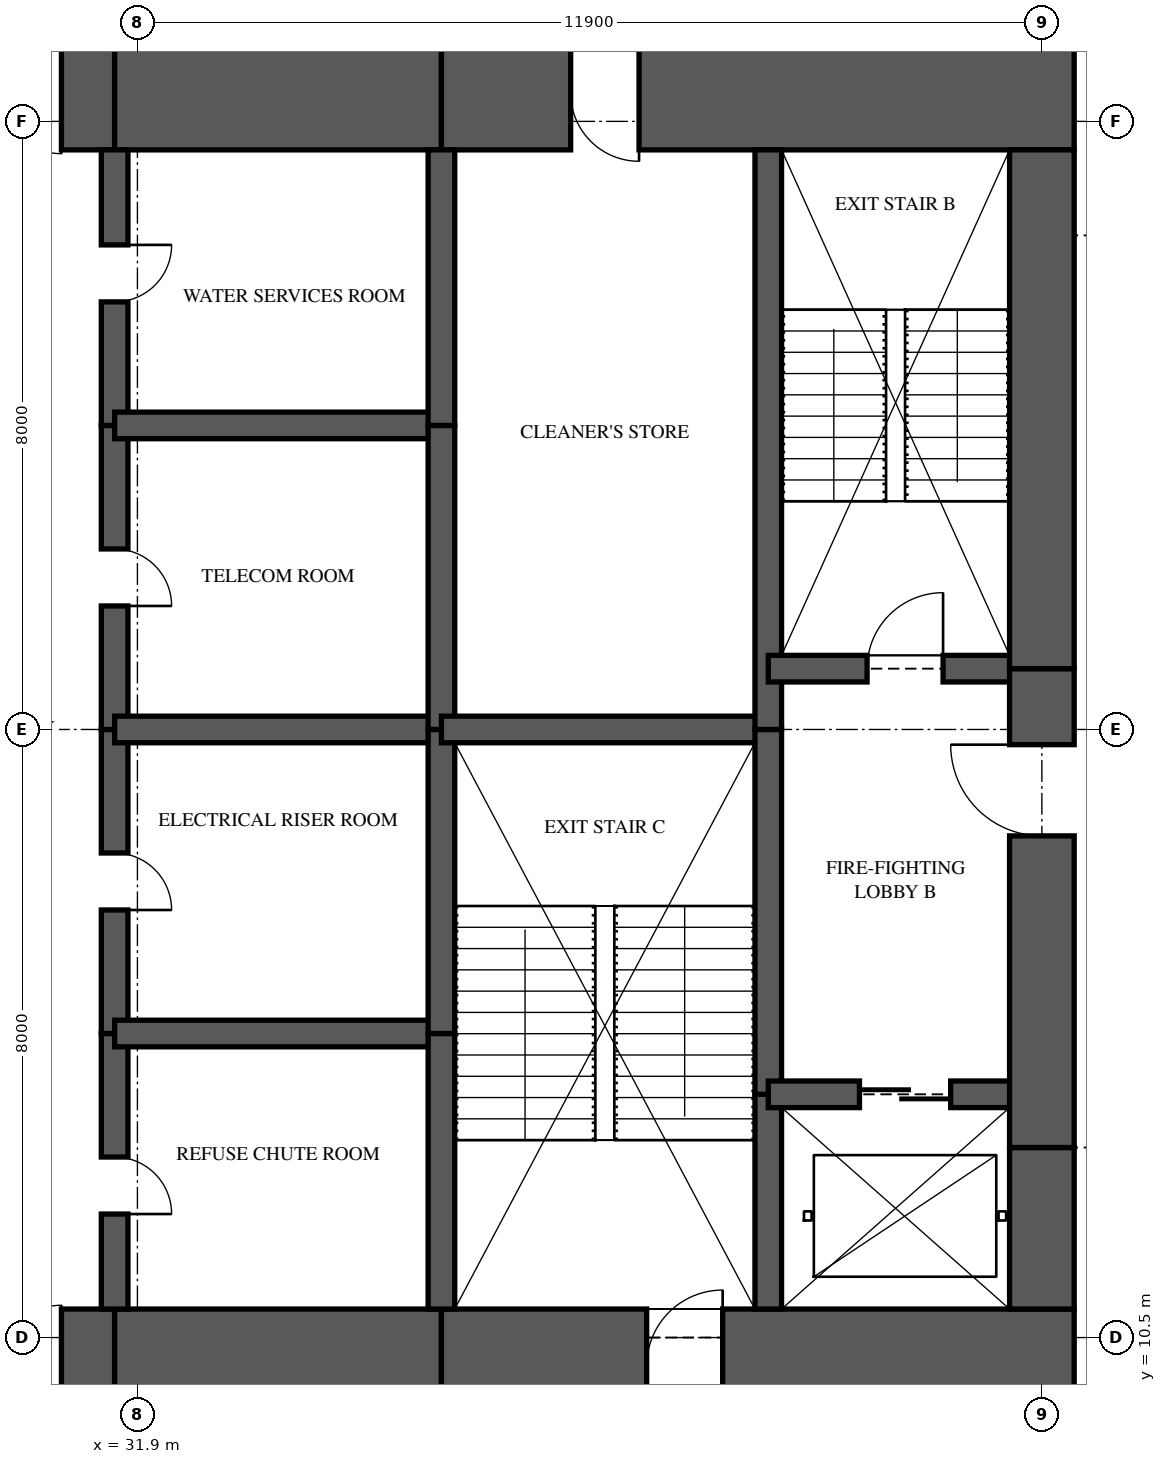
"""IFC4 building model, lengths in metres.
Left out: names, types, materials, properties, quantities, classifications, styles, units other than length and angle.
Written with IfcOpenShell. Run it as: python <this file> out.ifc"""

import sys

from ifc_helpers import new_model, si_unit, direction, frame, frame_2d, origin, place, context, subcontext, project, spatial, rectangle, extrude, element, fill, save


model = new_model("IFC4")
c1 = context("Model", 3, precision=1e-05, world=origin(), true_north=direction((0.0, 1.0)))
c2 = subcontext(c1, "Body", "Model", "MODEL_VIEW")
j1 = project(units=[si_unit("LENGTHUNIT", "METRE"), si_unit("PLANEANGLEUNIT", "RADIAN")], contexts=[c1])
p1 = place(None, origin())
s1 = spatial("IfcSite", under=j1, at=p1, CompositionType="ELEMENT")
p2 = place(p1, origin())
s2 = spatial("IfcBuilding", under=s1, at=p2, CompositionType="ELEMENT")
p3 = place(p2, frame((0.0, 0.0, 124.95)))
s3 = spatial("IfcBuildingStorey", under=s2, at=p3, CompositionType="ELEMENT", Elevation=124.95)
p4 = place(p3, frame((26.0, 10.125, 0.0), z_axis=(0.0, 0.0, 1.0), x_axis=(1.0, 0.0, 0.0)))
e1 = element("IfcWall", 1, at=p4, inside=s3, PredefinedType="SHEAR", context=c2, shape_type="SweptSolid", body=[
    extrude(rectangle(XDim=5.6, YDim=1.5, at=frame_2d((2.8, 0.0))), origin(), (0.0, 0.0, 1.0), 3.35),
])
p5 = place(p4, frame((3.3, 0.0, 0.0)))
e2 = element("IfcOpeningElement", 2, at=p5, cuts=e1, PredefinedType="OPENING", context=c2, shape_type="SweptSolid", body=[
    extrude(rectangle(XDim=1.6, YDim=2.1, at=frame_2d((0.8, 1.05))), frame((0.0, 0.76, 0.0), z_axis=(0.0, -1.0, 0.0), x_axis=(1.0, 0.0, 0.0)), (0.0, 0.0, 1.0), 1.52),
])
p6 = place(p3, frame((31.6, 10.125, 0.0), z_axis=(0.0, 0.0, 1.0), x_axis=(1.0, 0.0, 0.0)))
e3 = element("IfcWall", 3, at=p6, inside=s3, PredefinedType="SHEAR", context=c2, shape_type="SweptSolid", body=[
    extrude(rectangle(XDim=4.3, YDim=1.5, at=frame_2d((2.15, 0.0))), origin(), (0.0, 0.0, 1.0), 3.35),
])
p7 = place(p3, frame((35.9, 10.125, 0.0), z_axis=(0.0, 0.0, 1.0), x_axis=(1.0, 0.0, 0.0)))
e4 = element("IfcWall", 4, at=p7, inside=s3, PredefinedType="SHEAR", context=c2, shape_type="SweptSolid", body=[
    extrude(rectangle(XDim=8.325, YDim=1.5, at=frame_2d((4.163, 0.0))), origin(), (0.0, 0.0, 1.0), 3.35),
])
p8 = place(p7, frame((2.7, 0.0, 0.0)))
e5 = element("IfcOpeningElement", 5, at=p8, cuts=e4, PredefinedType="OPENING", context=c2, shape_type="SweptSolid", body=[
    extrude(rectangle(XDim=1.0, YDim=2.1, at=frame_2d((0.5, 1.05))), frame((0.0, 0.76, 0.0), z_axis=(0.0, -1.0, 0.0), x_axis=(1.0, 0.0, 0.0)), (0.0, 0.0, 1.0), 1.52),
])
p9 = place(p3, frame((44.225, 26.875, 0.0), z_axis=(0.0, 0.0, 1.0), x_axis=(-1.0, 0.0, 0.0)))
e6 = element("IfcWall", 6, at=p9, inside=s3, PredefinedType="SHEAR", context=c2, shape_type="SweptSolid", body=[
    extrude(rectangle(XDim=8.325, YDim=1.5, at=frame_2d((4.163, 0.0))), origin(), (0.0, 0.0, 1.0), 3.35),
])
p10 = place(p9, frame((5.725, 0.0, 0.0)))
e7 = element("IfcOpeningElement", 7, at=p10, cuts=e6, PredefinedType="OPENING", context=c2, shape_type="SweptSolid", body=[
    extrude(rectangle(XDim=0.9, YDim=2.1, at=frame_2d((0.45, 1.05))), frame((0.0, 0.76, 0.0), z_axis=(0.0, -1.0, 0.0), x_axis=(1.0, 0.0, 0.0)), (0.0, 0.0, 1.0), 1.52),
])
p11 = place(p3, frame((35.9, 26.875, 0.0), z_axis=(0.0, 0.0, 1.0), x_axis=(-1.0, 0.0, 0.0)))
e8 = element("IfcWall", 8, at=p11, inside=s3, PredefinedType="SHEAR", context=c2, shape_type="SweptSolid", body=[
    extrude(rectangle(XDim=4.3, YDim=1.5, at=frame_2d((2.15, 0.0))), origin(), (0.0, 0.0, 1.0), 3.35),
])
p12 = place(p3, frame((31.6, 26.875, 0.0), z_axis=(0.0, 0.0, 1.0), x_axis=(-1.0, 0.0, 0.0)))
e9 = element("IfcWall", 9, at=p12, inside=s3, PredefinedType="SHEAR", context=c2, shape_type="SweptSolid", body=[
    extrude(rectangle(XDim=5.6, YDim=1.5, at=frame_2d((2.8, 0.0))), origin(), (0.0, 0.0, 1.0), 3.35),
])
p13 = place(p12, frame((0.7, 0.0, 0.0)))
e10 = element("IfcOpeningElement", 10, at=p13, cuts=e9, PredefinedType="OPENING", context=c2, shape_type="SweptSolid", body=[
    extrude(rectangle(XDim=1.6, YDim=2.1, at=frame_2d((0.8, 1.05))), frame((0.0, 0.76, 0.0), z_axis=(0.0, -1.0, 0.0), x_axis=(1.0, 0.0, 0.0)), (0.0, 0.0, 1.0), 1.52),
])
p14 = place(p3, frame((43.8, 10.875, 0.0), z_axis=(0.0, 0.0, 1.0), x_axis=(0.0, 1.0, 0.0)))
e11 = element("IfcWall", 11, at=p14, inside=s3, PredefinedType="SHEAR", context=c2, shape_type="SweptSolid", body=[
    extrude(rectangle(XDim=2.125, YDim=0.85, at=frame_2d((1.062, 0.0))), origin(), (0.0, 0.0, 1.0), 3.35),
])
p15 = place(p3, frame((43.8, 13.0, 0.0), z_axis=(0.0, 0.0, 1.0), x_axis=(0.0, 1.0, 0.0)))
e12 = element("IfcWall", 12, at=p15, inside=s3, PredefinedType="SHEAR", context=c2, shape_type="SweptSolid", body=[
    extrude(rectangle(XDim=6.3, YDim=0.85, at=frame_2d((3.15, 0.0))), origin(), (0.0, 0.0, 1.0), 3.35),
])
p16 = place(p15, frame((4.1, 0.0, 0.0)))
e13 = element("IfcOpeningElement", 13, at=p16, cuts=e12, PredefinedType="OPENING", context=c2, shape_type="SweptSolid", body=[
    extrude(rectangle(XDim=1.2, YDim=2.2, at=frame_2d((0.6, 1.1))), frame((0.0, 0.435, 0.0), z_axis=(0.0, -1.0, 0.0), x_axis=(1.0, 0.0, 0.0)), (0.0, 0.0, 1.0), 0.87),
])
p17 = place(p3, frame((43.8, 19.3, 0.0), z_axis=(0.0, 0.0, 1.0), x_axis=(0.0, 1.0, 0.0)))
e14 = element("IfcWall", 14, at=p17, inside=s3, PredefinedType="SHEAR", context=c2, shape_type="SweptSolid", body=[
    extrude(rectangle(XDim=6.825, YDim=0.85, at=frame_2d((3.413, 0.0))), origin(), (0.0, 0.0, 1.0), 3.35),
])
p18 = place(p3, frame((31.6, 10.875, 0.0), z_axis=(0.0, 0.0, 1.0), x_axis=(0.0, 1.0, 0.0)))
e15 = element("IfcWall", 15, at=p18, inside=s3, PredefinedType="SHEAR", context=c2, shape_type="SweptSolid", body=[
    extrude(rectangle(XDim=3.625, YDim=0.35, at=frame_2d((1.812, 0.0))), origin(), (0.0, 0.0, 1.0), 3.35),
])
p19 = place(p18, frame((1.25, 0.0, 0.0)))
e16 = element("IfcOpeningElement", 16, at=p19, cuts=e15, PredefinedType="OPENING", context=c2, shape_type="SweptSolid", body=[
    extrude(rectangle(XDim=0.75, YDim=2.1, at=frame_2d((0.375, 1.05))), frame((0.0, 0.185, 0.0), z_axis=(0.0, -1.0, 0.0), x_axis=(1.0, 0.0, 0.0)), (0.0, 0.0, 1.0), 0.37),
])
p20 = place(p3, frame((31.6, 14.5, 0.0), z_axis=(0.0, 0.0, 1.0), x_axis=(0.0, 1.0, 0.0)))
e17 = element("IfcWall", 17, at=p20, inside=s3, PredefinedType="SHEAR", context=c2, shape_type="SweptSolid", body=[
    extrude(rectangle(XDim=4.0, YDim=0.35, at=frame_2d((2.0, 0.0))), origin(), (0.0, 0.0, 1.0), 3.35),
])
p21 = place(p20, frame((1.625, 0.0, 0.0)))
e18 = element("IfcOpeningElement", 18, at=p21, cuts=e17, PredefinedType="OPENING", context=c2, shape_type="SweptSolid", body=[
    extrude(rectangle(XDim=0.75, YDim=2.1, at=frame_2d((0.375, 1.05))), frame((0.0, 0.185, 0.0), z_axis=(0.0, -1.0, 0.0), x_axis=(1.0, 0.0, 0.0)), (0.0, 0.0, 1.0), 0.37),
])
p22 = place(p3, frame((31.6, 18.5, 0.0), z_axis=(0.0, 0.0, 1.0), x_axis=(0.0, 1.0, 0.0)))
e19 = element("IfcWall", 19, at=p22, inside=s3, PredefinedType="SHEAR", context=c2, shape_type="SweptSolid", body=[
    extrude(rectangle(XDim=4.0, YDim=0.35, at=frame_2d((2.0, 0.0))), origin(), (0.0, 0.0, 1.0), 3.35),
])
p23 = place(p22, frame((1.625, 0.0, 0.0)))
e20 = element("IfcOpeningElement", 20, at=p23, cuts=e19, PredefinedType="OPENING", context=c2, shape_type="SweptSolid", body=[
    extrude(rectangle(XDim=0.75, YDim=2.1, at=frame_2d((0.375, 1.05))), frame((0.0, 0.185, 0.0), z_axis=(0.0, -1.0, 0.0), x_axis=(1.0, 0.0, 0.0)), (0.0, 0.0, 1.0), 0.37),
])
p24 = place(p3, frame((31.6, 22.5, 0.0), z_axis=(0.0, 0.0, 1.0), x_axis=(0.0, 1.0, 0.0)))
e21 = element("IfcWall", 21, at=p24, inside=s3, PredefinedType="SHEAR", context=c2, shape_type="SweptSolid", body=[
    extrude(rectangle(XDim=3.625, YDim=0.35, at=frame_2d((1.812, 0.0))), origin(), (0.0, 0.0, 1.0), 3.35),
])
p25 = place(p24, frame((1.625, 0.0, 0.0)))
e22 = element("IfcOpeningElement", 22, at=p25, cuts=e21, PredefinedType="OPENING", context=c2, shape_type="SweptSolid", body=[
    extrude(rectangle(XDim=0.75, YDim=2.1, at=frame_2d((0.375, 1.05))), frame((0.0, 0.185, 0.0), z_axis=(0.0, -1.0, 0.0), x_axis=(1.0, 0.0, 0.0)), (0.0, 0.0, 1.0), 0.37),
])
p26 = place(p3, frame((35.9, 10.875, 0.0), z_axis=(0.0, 0.0, 1.0), x_axis=(0.0, 1.0, 0.0)))
e23 = element("IfcWall", 23, at=p26, inside=s3, PredefinedType="SHEAR", context=c2, shape_type="SweptSolid", body=[
    extrude(rectangle(XDim=3.625, YDim=0.35, at=frame_2d((1.812, 0.0))), origin(), (0.0, 0.0, 1.0), 3.35),
])
for number, where, z_axis, x_axis in (
    (24, (35.9, 14.5, 0.0), (0.0, 0.0, 1.0), (0.0, 1.0, 0.0)),
    (25, (35.9, 18.5, 0.0), (0.0, 0.0, 1.0), (0.0, 1.0, 0.0)),
):
    element("IfcWall", number, at=place(p3, frame(where, z_axis=z_axis, x_axis=x_axis)), inside=s3, PredefinedType="SHEAR", context=c2, shape_type="SweptSolid", body=[
        extrude(rectangle(XDim=4.0, YDim=0.35, at=frame_2d((2.0, 0.0))), origin(), (0.0, 0.0, 1.0), 3.35),
    ])
p27 = place(p3, frame((35.9, 22.5, 0.0), z_axis=(0.0, 0.0, 1.0), x_axis=(0.0, 1.0, 0.0)))
e26 = element("IfcWall", 26, at=p27, inside=s3, PredefinedType="SHEAR", context=c2, shape_type="SweptSolid", body=[
    extrude(rectangle(XDim=3.625, YDim=0.35, at=frame_2d((1.812, 0.0))), origin(), (0.0, 0.0, 1.0), 3.35),
])
p28 = place(p3, frame((40.2, 10.875, 0.0), z_axis=(0.0, 0.0, 1.0), x_axis=(0.0, 1.0, 0.0)))
e27 = element("IfcWall", 27, at=p28, inside=s3, PredefinedType="SHEAR", context=c2, shape_type="SweptSolid", body=[
    extrude(rectangle(XDim=2.825, YDim=0.35, at=frame_2d((1.413, 0.0))), origin(), (0.0, 0.0, 1.0), 3.35),
])
p29 = place(p3, frame((40.2, 13.7, 0.0), z_axis=(0.0, 0.0, 1.0), x_axis=(0.0, 1.0, 0.0)))
e28 = element("IfcWall", 28, at=p29, inside=s3, PredefinedType="SHEAR", context=c2, shape_type="SweptSolid", body=[
    extrude(rectangle(XDim=4.8, YDim=0.35, at=frame_2d((2.4, 0.0))), origin(), (0.0, 0.0, 1.0), 3.35),
])
p30 = place(p3, frame((40.2, 18.5, 0.0), z_axis=(0.0, 0.0, 1.0), x_axis=(0.0, 1.0, 0.0)))
e29 = element("IfcWall", 29, at=p30, inside=s3, PredefinedType="SHEAR", context=c2, shape_type="SweptSolid", body=[
    extrude(rectangle(XDim=7.625, YDim=0.35, at=frame_2d((3.812, 0.0))), origin(), (0.0, 0.0, 1.0), 3.35),
])
for number, where, z_axis, x_axis in (
    (30, (31.6, 14.5, 0.0), (0.0, 0.0, 1.0), (1.0, 0.0, 0.0)),
    (31, (31.6, 18.5, 0.0), (0.0, 0.0, 1.0), (1.0, 0.0, 0.0)),
    (32, (31.6, 22.5, 0.0), (0.0, 0.0, 1.0), (1.0, 0.0, 0.0)),
):
    element("IfcWall", number, at=place(p3, frame(where, z_axis=z_axis, x_axis=x_axis)), inside=s3, PredefinedType="SHEAR", context=c2, shape_type="SweptSolid", body=[
        extrude(rectangle(XDim=4.3, YDim=0.35, at=frame_2d((2.15, 0.0))), origin(), (0.0, 0.0, 1.0), 3.35),
    ])
p31 = place(p3, frame((35.9, 18.5, 0.0), z_axis=(0.0, 0.0, 1.0), x_axis=(1.0, 0.0, 0.0)))
e33 = element("IfcWall", 33, at=p31, inside=s3, PredefinedType="SHEAR", context=c2, shape_type="SweptSolid", body=[
    extrude(rectangle(XDim=4.3, YDim=0.35, at=frame_2d((2.15, 0.0))), origin(), (0.0, 0.0, 1.0), 3.35),
])
p32 = place(p3, frame((40.2, 13.7, 0.0), z_axis=(0.0, 0.0, 1.0), x_axis=(1.0, 0.0, 0.0)))
e34 = element("IfcWall", 34, at=p32, inside=s3, PredefinedType="SHEAR", context=c2, shape_type="SweptSolid", body=[
    extrude(rectangle(XDim=3.6, YDim=0.35, at=frame_2d((1.8, 0.0))), origin(), (0.0, 0.0, 1.0), 3.35),
])
p33 = place(p32, frame((1.2, 0.0, 0.0)))
e35 = element("IfcOpeningElement", 35, at=p33, cuts=e34, PredefinedType="OPENING", context=c2, shape_type="SweptSolid", body=[
    extrude(rectangle(XDim=1.2, YDim=2.1, at=frame_2d((0.6, 1.05))), frame((0.0, 0.185, 0.0), z_axis=(0.0, -1.0, 0.0), x_axis=(1.0, 0.0, 0.0)), (0.0, 0.0, 1.0), 0.37),
])
p34 = place(p3, frame((40.2, 19.3, 0.0), z_axis=(0.0, 0.0, 1.0), x_axis=(1.0, 0.0, 0.0)))
e36 = element("IfcWall", 36, at=p34, inside=s3, PredefinedType="SHEAR", context=c2, shape_type="SweptSolid", body=[
    extrude(rectangle(XDim=3.6, YDim=0.35, at=frame_2d((1.8, 0.0))), origin(), (0.0, 0.0, 1.0), 3.35),
])
p35 = place(p34, frame((1.3, 0.0, 0.0)))
e37 = element("IfcOpeningElement", 37, at=p35, cuts=e36, PredefinedType="OPENING", context=c2, shape_type="SweptSolid", body=[
    extrude(rectangle(XDim=1.0, YDim=2.1, at=frame_2d((0.5, 1.05))), frame((0.0, 0.185, 0.0), z_axis=(0.0, -1.0, 0.0), x_axis=(1.0, 0.0, 0.0)), (0.0, 0.0, 1.0), 0.37),
])
p36 = place(p35, origin())
e38 = element("IfcDoor", 38, at=p36, inside=s3, OperationType="SINGLE_SWING_RIGHT", PredefinedType="DOOR", context=c2, shape_type="SweptSolid", body=[
    extrude(rectangle(XDim=1.0, YDim=2.1, at=frame_2d((0.5, 1.05))), frame((0.0, 0.025, 0.0), z_axis=(0.0, -1.0, 0.0), x_axis=(1.0, 0.0, 0.0)), (0.0, 0.0, 1.0), 0.05),
])
fill(e37, e38)
p37 = place(p16, origin())
e39 = element("IfcDoor", 39, at=p37, inside=s3, OperationType="SINGLE_SWING_RIGHT", PredefinedType="DOOR", context=c2, shape_type="SweptSolid", body=[
    extrude(rectangle(XDim=1.2, YDim=2.2, at=frame_2d((0.6, 1.1))), frame((0.0, 0.025, 0.0), z_axis=(0.0, -1.0, 0.0), x_axis=(1.0, 0.0, 0.0)), (0.0, 0.0, 1.0), 0.05),
])
fill(e13, e39)
p38 = place(p33, origin())
e40 = element("IfcDoor", 40, at=p38, inside=s3, OperationType="SLIDING_TO_LEFT", PredefinedType="DOOR", context=c2, shape_type="SweptSolid", body=[
    extrude(rectangle(XDim=1.2, YDim=2.1, at=frame_2d((0.6, 1.05))), frame((0.0, 0.025, 0.0), z_axis=(0.0, -1.0, 0.0), x_axis=(1.0, 0.0, 0.0)), (0.0, 0.0, 1.0), 0.05),
])
fill(e35, e40)
p39 = place(p5, origin())
e41 = element("IfcDoor", 41, at=p39, inside=s3, OperationType="DOUBLE_DOOR_SINGLE_SWING", PredefinedType="DOOR", context=c2, shape_type="SweptSolid", body=[
    extrude(rectangle(XDim=1.6, YDim=2.1, at=frame_2d((0.8, 1.05))), frame((0.0, 0.025, 0.0), z_axis=(0.0, -1.0, 0.0), x_axis=(1.0, 0.0, 0.0)), (0.0, 0.0, 1.0), 0.05),
])
fill(e2, e41)
p40 = place(p13, origin())
e42 = element("IfcDoor", 42, at=p40, inside=s3, OperationType="DOUBLE_DOOR_SINGLE_SWING", PredefinedType="DOOR", context=c2, shape_type="SweptSolid", body=[
    extrude(rectangle(XDim=1.6, YDim=2.1, at=frame_2d((0.8, 1.05))), frame((0.0, 0.025, 0.0), z_axis=(0.0, -1.0, 0.0), x_axis=(1.0, 0.0, 0.0)), (0.0, 0.0, 1.0), 0.05),
])
fill(e10, e42)
p41 = place(p19, frame((0.75, 0.0, 0.0), z_axis=(0.0, 0.0, 1.0), x_axis=(-1.0, 0.0, 0.0)))
e43 = element("IfcDoor", 43, at=p41, inside=s3, OperationType="SINGLE_SWING_RIGHT", PredefinedType="DOOR", context=c2, shape_type="SweptSolid", body=[
    extrude(rectangle(XDim=0.75, YDim=2.1, at=frame_2d((0.375, 1.05))), frame((0.0, 0.025, 0.0), z_axis=(0.0, -1.0, 0.0), x_axis=(1.0, 0.0, 0.0)), (0.0, 0.0, 1.0), 0.05),
])
fill(e16, e43)
p42 = place(p21, frame((0.75, 0.0, 0.0), z_axis=(0.0, 0.0, 1.0), x_axis=(-1.0, 0.0, 0.0)))
e44 = element("IfcDoor", 44, at=p42, inside=s3, OperationType="SINGLE_SWING_RIGHT", PredefinedType="DOOR", context=c2, shape_type="SweptSolid", body=[
    extrude(rectangle(XDim=0.75, YDim=2.1, at=frame_2d((0.375, 1.05))), frame((0.0, 0.025, 0.0), z_axis=(0.0, -1.0, 0.0), x_axis=(1.0, 0.0, 0.0)), (0.0, 0.0, 1.0), 0.05),
])
fill(e18, e44)
p43 = place(p23, frame((0.75, 0.0, 0.0), z_axis=(0.0, 0.0, 1.0), x_axis=(-1.0, 0.0, 0.0)))
e45 = element("IfcDoor", 45, at=p43, inside=s3, OperationType="SINGLE_SWING_RIGHT", PredefinedType="DOOR", context=c2, shape_type="SweptSolid", body=[
    extrude(rectangle(XDim=0.75, YDim=2.1, at=frame_2d((0.375, 1.05))), frame((0.0, 0.025, 0.0), z_axis=(0.0, -1.0, 0.0), x_axis=(1.0, 0.0, 0.0)), (0.0, 0.0, 1.0), 0.05),
])
fill(e20, e45)
p44 = place(p25, frame((0.75, 0.0, 0.0), z_axis=(0.0, 0.0, 1.0), x_axis=(-1.0, 0.0, 0.0)))
e46 = element("IfcDoor", 46, at=p44, inside=s3, OperationType="SINGLE_SWING_LEFT", PredefinedType="DOOR", context=c2, shape_type="SweptSolid", body=[
    extrude(rectangle(XDim=0.75, YDim=2.1, at=frame_2d((0.375, 1.05))), frame((0.0, 0.025, 0.0), z_axis=(0.0, -1.0, 0.0), x_axis=(1.0, 0.0, 0.0)), (0.0, 0.0, 1.0), 0.05),
])
fill(e22, e46)
p45 = place(p8, origin())
e47 = element("IfcDoor", 47, at=p45, inside=s3, OperationType="SINGLE_SWING_RIGHT", PredefinedType="DOOR", context=c2, shape_type="SweptSolid", body=[
    extrude(rectangle(XDim=1.0, YDim=2.1, at=frame_2d((0.5, 1.05))), frame((0.0, 0.025, 0.0), z_axis=(0.0, -1.0, 0.0), x_axis=(1.0, 0.0, 0.0)), (0.0, 0.0, 1.0), 0.05),
])
fill(e5, e47)
p46 = place(p10, origin())
e48 = element("IfcDoor", 48, at=p46, inside=s3, OperationType="SINGLE_SWING_LEFT", PredefinedType="DOOR", context=c2, shape_type="SweptSolid", body=[
    extrude(rectangle(XDim=0.9, YDim=2.1, at=frame_2d((0.45, 1.05))), frame((0.0, 0.47, 0.0), z_axis=(0.0, -1.0, 0.0), x_axis=(1.0, 0.0, 0.0)), (0.0, 0.0, 1.0), 0.8),
])
fill(e7, e48)
save(model, sys.argv[1])
